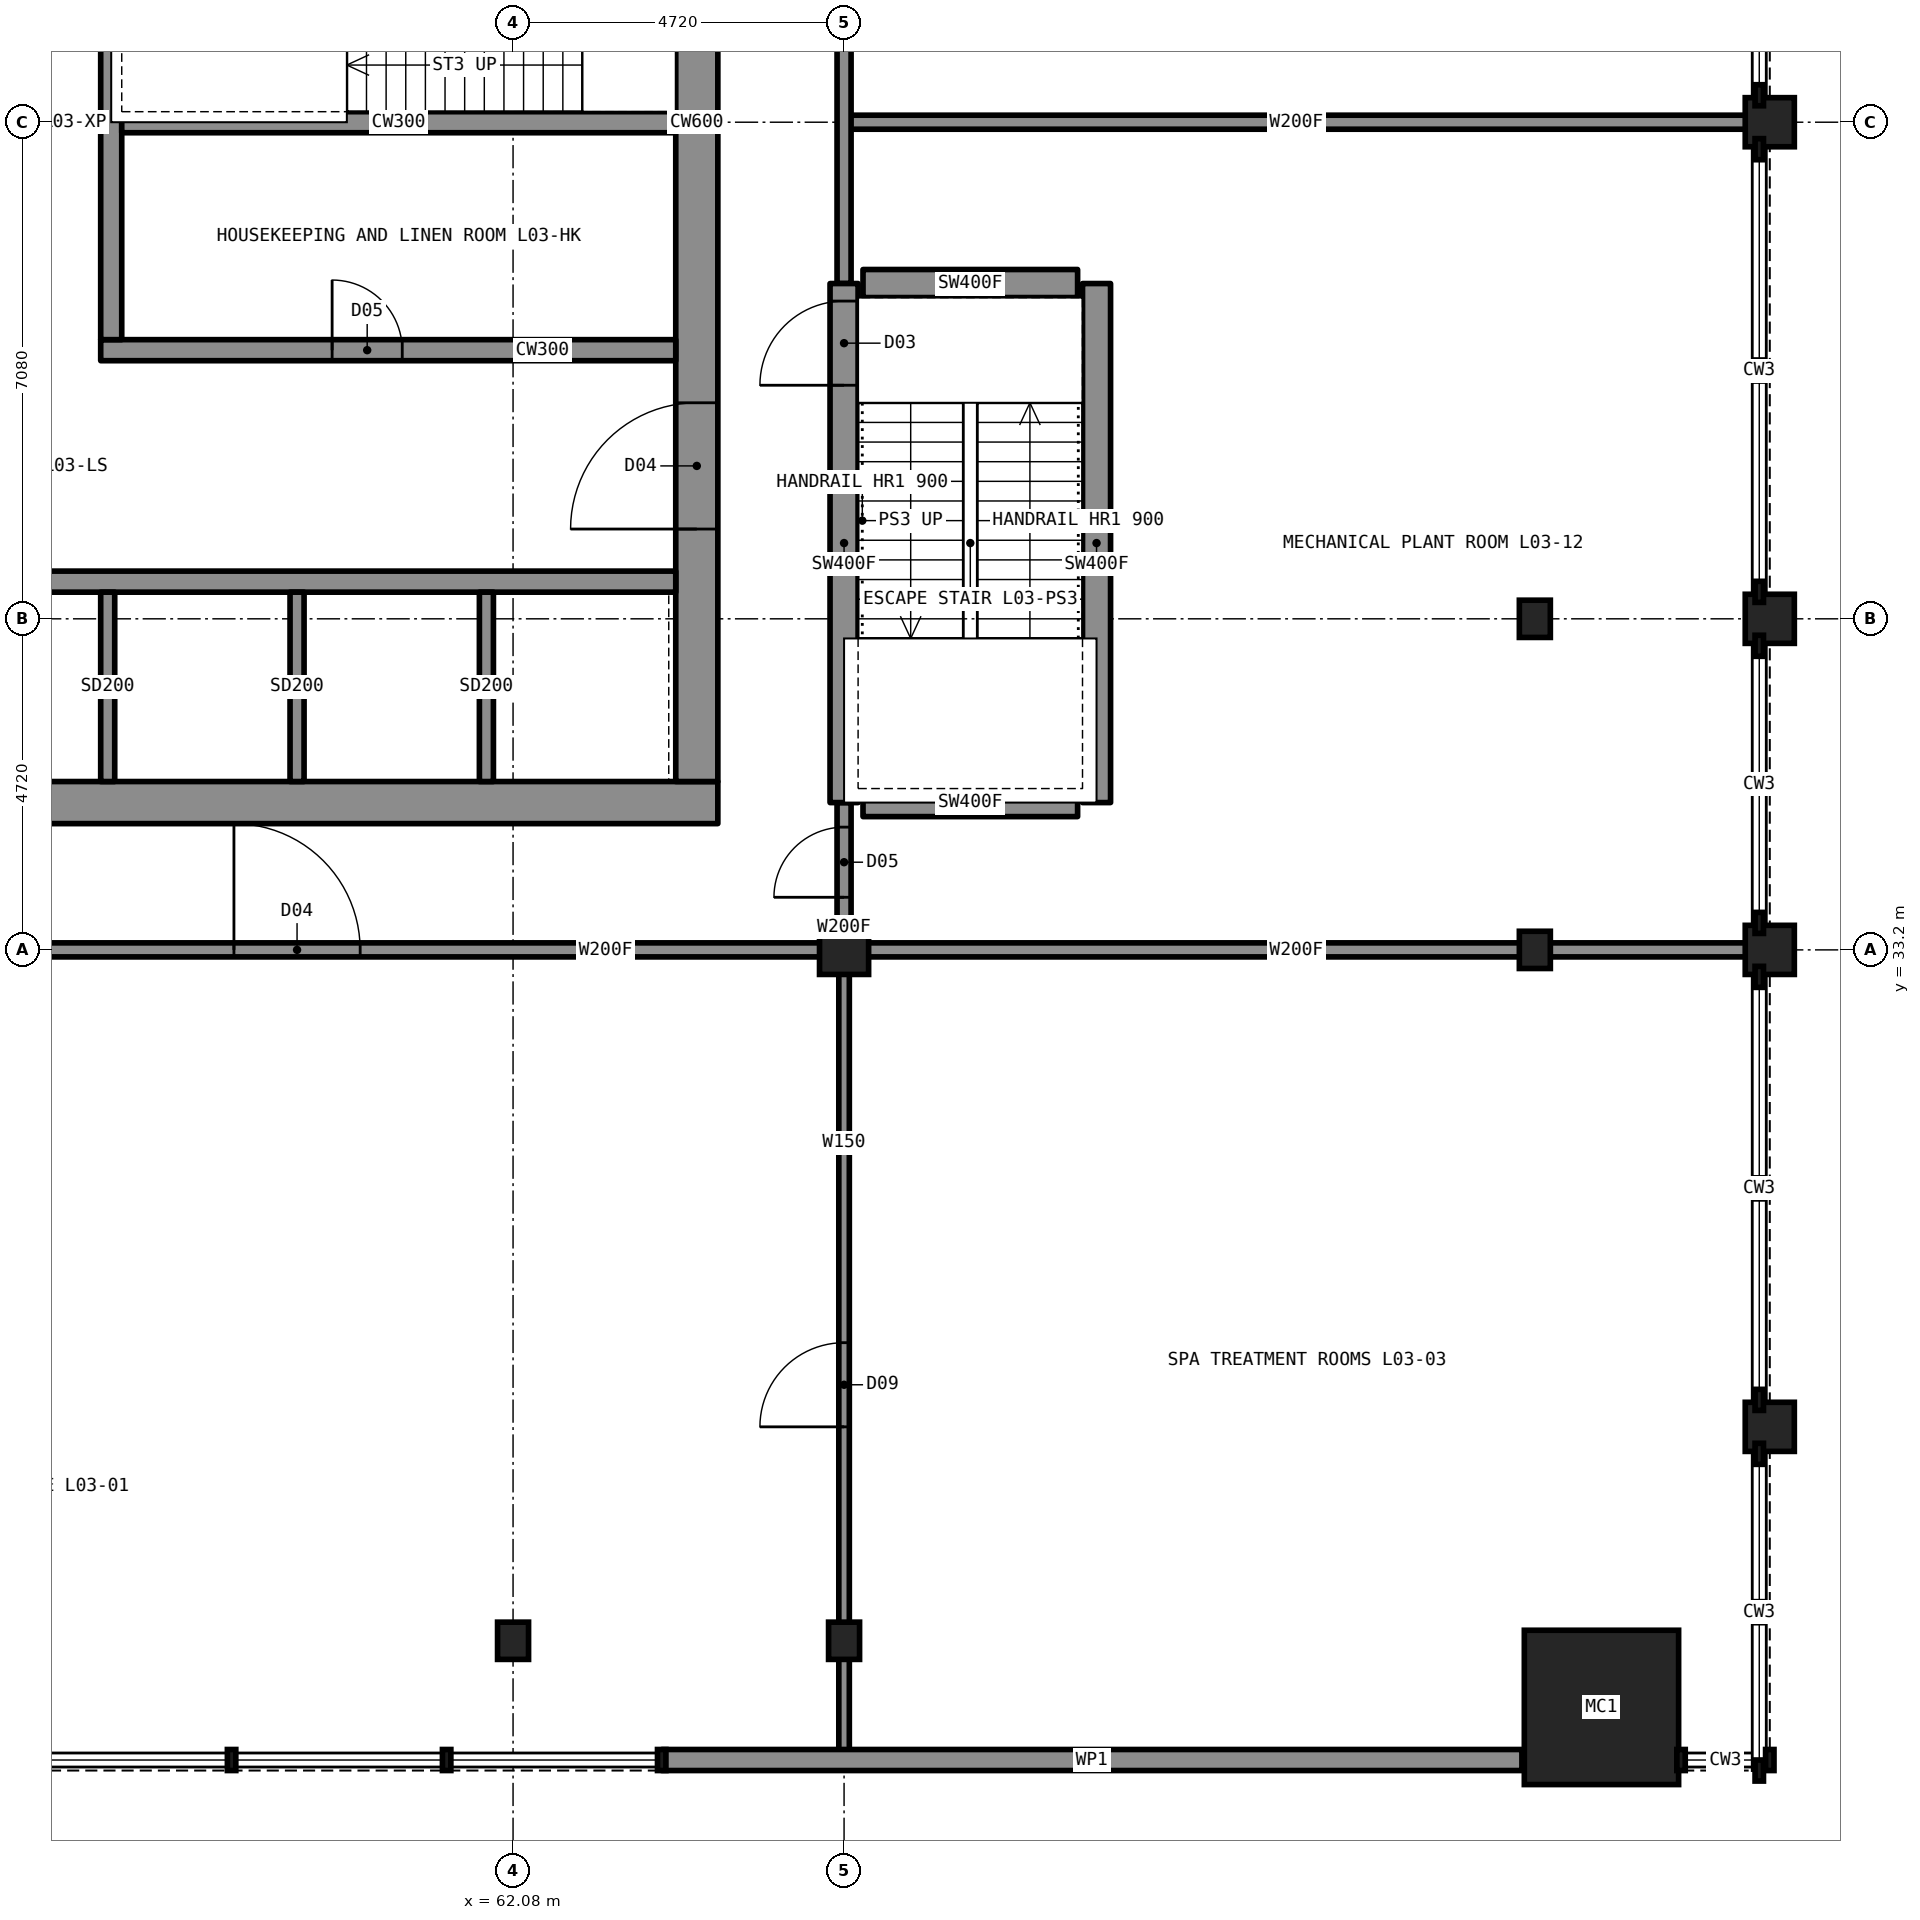
"""IFC4 building model, lengths in metres.
Left out: names, types, materials, properties, quantities, classifications, styles, units other than length and angle.
Written with IfcOpenShell. Run it as: python <this file> out.ifc"""

import sys

from ifc_helpers import new_model, si_unit, direction, frame, frame_2d, origin, origin_2d, place, context, subcontext, project, spatial, rectangle, hollow_rectangle, i_section, extrude, element, fill, save


model = new_model("IFC4")
c1 = context("Model", 3, precision=1e-05, world=origin(), true_north=direction((0.0, 1.0)))
c2 = subcontext(c1, "Body", "Model", "MODEL_VIEW")
j1 = project(units=[si_unit("LENGTHUNIT", "METRE"), si_unit("PLANEANGLEUNIT", "RADIAN")], contexts=[c1])
p1 = place(None, origin())
s1 = spatial("IfcSite", under=j1, at=p1, CompositionType="ELEMENT")
p2 = place(p1, origin())
s2 = spatial("IfcBuilding", under=s1, at=p2, CompositionType="ELEMENT")
p3 = place(p2, frame((0.0, 0.0, 16.0)))
s3 = spatial("IfcBuildingStorey", under=s2, at=p3, CompositionType="ELEMENT", Elevation=16.0)
for number, where, z_axis, x_axis in (
    (1, (62.08, 23.35, 0.0), (0.0, 0.0, 1.0), (1.0, 0.0, 0.0)),
    (2, (66.8, 23.35, 0.0), (0.0, 0.0, 1.0), (1.0, 0.0, 0.0)),
    (3, (76.65, 33.2, 0.0), (0.0, 0.0, 1.0), (1.0, 0.0, 0.0)),
    (4, (76.65, 37.92, 0.0), (0.0, 0.0, 1.0), (1.0, 0.0, 0.0)),
):
    element("IfcColumn", number, at=place(p3, frame(where, z_axis=z_axis, x_axis=x_axis)), inside=s3, PredefinedType="COLUMN", context=c2, shape_type="SweptSolid", body=[
        extrude(i_section(OverallWidth=0.442, OverallDepth=0.531, WebThickness=0.066, FlangeThickness=0.106, at=origin_2d()), origin(), (0.0, 0.0, 1.0), 4.5),
    ])
p4 = place(p3, frame((66.8, 33.2, 0.0), z_axis=(0.0, 0.0, 1.0), x_axis=(1.0, 0.0, 0.0)))
e5 = element("IfcColumn", 5, at=p4, inside=s3, PredefinedType="COLUMN", context=c2, shape_type="SweptSolid", body=[
    extrude(hollow_rectangle(XDim=0.7, YDim=0.7, WallThickness=0.06, at=origin_2d()), origin(), (0.0, 0.0, 1.0), 4.5),
])
p5 = place(p3, frame((77.6, 22.4, 0.0), z_axis=(0.0, 0.0, 1.0), x_axis=(1.0, 0.0, 0.0)))
e6 = element("IfcColumn", 6, at=p5, inside=s3, PredefinedType="COLUMN", context=c2, shape_type="SweptSolid", body=[
    extrude(hollow_rectangle(XDim=2.2, YDim=2.2, WallThickness=0.15, at=origin_2d()), origin(), (0.0, 0.0, 1.0), 4.5),
])
for number, where, z_axis, x_axis in (
    (7, (80.0, 26.4, 0.0), (0.0, 0.0, 1.0), (1.0, 0.0, 0.0)),
    (8, (80.0, 33.2, 0.0), (0.0, 0.0, 1.0), (1.0, 0.0, 0.0)),
    (9, (80.0, 37.92, 0.0), (0.0, 0.0, 1.0), (1.0, 0.0, 0.0)),
    (10, (80.0, 45.0, 0.0), (0.0, 0.0, 1.0), (1.0, 0.0, 0.0)),
):
    element("IfcColumn", number, at=place(p3, frame(where, z_axis=z_axis, x_axis=x_axis)), inside=s3, PredefinedType="COLUMN", context=c2, shape_type="SweptSolid", body=[
        extrude(rectangle(XDim=0.7, YDim=0.7, at=origin_2d()), origin(), (0.0, 0.0, 1.0), 4.5),
    ])
p6 = place(p3, frame((45.0, 35.3, 0.0), z_axis=(0.0, 0.0, 1.0), x_axis=(1.0, 0.0, 0.0)))
e11 = element("IfcWall", 11, at=p6, inside=s3, PredefinedType="SHEAR", context=c2, shape_type="SweptSolid", body=[
    extrude(rectangle(XDim=20.0, YDim=0.6, at=frame_2d((10.0, 0.0))), origin(), (0.0, 0.0, 1.0), 4.5),
])
p7 = place(p3, frame((64.7, 35.6, 0.0), z_axis=(0.0, 0.0, 1.0), x_axis=(0.0, 1.0, 0.0)))
e12 = element("IfcWall", 12, at=p7, inside=s3, PredefinedType="SHEAR", context=c2, shape_type="SweptSolid", body=[
    extrude(rectangle(XDim=18.8, YDim=0.6, at=frame_2d((9.4, 0.0))), origin(), (0.0, 0.0, 1.0), 4.5),
])
p8 = place(p7, frame((13.4, 0.0, 0.0)))
e13 = element("IfcOpeningElement", 13, at=p8, cuts=e12, PredefinedType="OPENING", context=c2, shape_type="SweptSolid", body=[
    extrude(rectangle(XDim=1.8, YDim=2.2, at=frame_2d((0.9, 1.1))), frame((0.0, 0.31, 0.0), z_axis=(0.0, -1.0, 0.0), x_axis=(1.0, 0.0, 0.0)), (0.0, 0.0, 1.0), 0.62),
])
p9 = place(p7, frame((3.6, 0.0, 0.0)))
e14 = element("IfcOpeningElement", 14, at=p9, cuts=e12, PredefinedType="OPENING", context=c2, shape_type="SweptSolid", body=[
    extrude(rectangle(XDim=1.8, YDim=2.2, at=frame_2d((0.9, 1.1))), frame((0.0, 0.31, 0.0), z_axis=(0.0, -1.0, 0.0), x_axis=(1.0, 0.0, 0.0)), (0.0, 0.0, 1.0), 0.62),
])
p10 = place(p3, frame((45.6, 38.45, 0.0), z_axis=(0.0, 0.0, 1.0), x_axis=(1.0, 0.0, 0.0)))
e15 = element("IfcWall", 15, at=p10, inside=s3, PredefinedType="SHEAR", context=c2, shape_type="SweptSolid", body=[
    extrude(rectangle(XDim=18.8, YDim=0.3, at=frame_2d((9.4, 0.0))), origin(), (0.0, 0.0, 1.0), 4.5),
])
p11 = place(p3, frame((56.2, 41.75, 0.0), z_axis=(0.0, 0.0, 1.0), x_axis=(1.0, 0.0, 0.0)))
e16 = element("IfcWall", 16, at=p11, inside=s3, PredefinedType="SHEAR", context=c2, shape_type="SweptSolid", body=[
    extrude(rectangle(XDim=8.2, YDim=0.3, at=frame_2d((4.1, 0.0))), origin(), (0.0, 0.0, 1.0), 4.5),
])
p12 = place(p11, frame((3.3, 0.0, 0.0)))
e17 = element("IfcOpeningElement", 17, at=p12, cuts=e16, PredefinedType="OPENING", context=c2, shape_type="SweptSolid", body=[
    extrude(rectangle(XDim=1.0, YDim=2.1, at=frame_2d((0.5, 1.05))), frame((0.0, 0.16, 0.0), z_axis=(0.0, -1.0, 0.0), x_axis=(1.0, 0.0, 0.0)), (0.0, 0.0, 1.0), 0.32),
])
p13 = place(p3, frame((56.35, 41.9, 0.0), z_axis=(0.0, 0.0, 1.0), x_axis=(0.0, 1.0, 0.0)))
e18 = element("IfcWall", 18, at=p13, inside=s3, PredefinedType="SHEAR", context=c2, shape_type="SweptSolid", body=[
    extrude(rectangle(XDim=9.5, YDim=0.3, at=frame_2d((4.75, 0.0))), origin(), (0.0, 0.0, 1.0), 4.5),
])
p14 = place(p13, frame((7.1, 0.0, 0.0)))
e19 = element("IfcOpeningElement", 19, at=p14, cuts=e18, PredefinedType="OPENING", context=c2, shape_type="SweptSolid", body=[
    extrude(rectangle(XDim=1.8, YDim=2.2, at=frame_2d((0.9, 1.1))), frame((0.0, 0.16, 0.0), z_axis=(0.0, -1.0, 0.0), x_axis=(1.0, 0.0, 0.0)), (0.0, 0.0, 1.0), 0.32),
])
p15 = place(p3, frame((56.5, 45.0, 0.0), z_axis=(0.0, 0.0, 1.0), x_axis=(1.0, 0.0, 0.0)))
e20 = element("IfcWall", 20, at=p15, inside=s3, PredefinedType="SHEAR", context=c2, shape_type="SweptSolid", body=[
    extrude(rectangle(XDim=7.9, YDim=0.3, at=frame_2d((3.95, 0.0))), origin(), (0.0, 0.0, 1.0), 4.5),
])
p16 = place(p3, frame((52.7, 33.2, 0.0), z_axis=(0.0, 0.0, 1.0), x_axis=(1.0, 0.0, 0.0)))
e21 = element("IfcWall", 21, at=p16, inside=s3, PredefinedType="PARTITIONING", context=c2, shape_type="SweptSolid", body=[
    extrude(rectangle(XDim=14.1, YDim=0.2, at=frame_2d((7.05, 0.0))), origin(), (0.0, 0.0, 1.0), 4.15),
])
p17 = place(p16, frame((5.4, 0.0, 0.0)))
e22 = element("IfcOpeningElement", 22, at=p17, cuts=e21, PredefinedType="OPENING", context=c2, shape_type="SweptSolid", body=[
    extrude(rectangle(XDim=1.8, YDim=2.2, at=frame_2d((0.9, 1.1))), frame((0.0, 0.11, 0.0), z_axis=(0.0, -1.0, 0.0), x_axis=(1.0, 0.0, 0.0)), (0.0, 0.0, 1.0), 0.22),
])
p18 = place(p3, frame((66.8, 33.2, 0.0), z_axis=(0.0, 0.0, 1.0), x_axis=(1.0, 0.0, 0.0)))
e23 = element("IfcWall", 23, at=p18, inside=s3, PredefinedType="PARTITIONING", context=c2, shape_type="SweptSolid", body=[
    extrude(rectangle(XDim=12.9, YDim=0.2, at=frame_2d((6.45, 0.0))), origin(), (0.0, 0.0, 1.0), 4.15),
])
for number, where, z_axis, x_axis in (
    (24, (67.07, 42.7, 0.0), (0.0, 0.0, 1.0), (1.0, 0.0, 0.0)),
    (25, (67.07, 35.3, 0.0), (0.0, 0.0, 1.0), (1.0, 0.0, 0.0)),
):
    element("IfcWall", number, at=place(p3, frame(where, z_axis=z_axis, x_axis=x_axis)), inside=s3, PredefinedType="SHEAR", context=c2, shape_type="SweptSolid", body=[
        extrude(rectangle(XDim=3.06, YDim=0.4, at=frame_2d((1.53, 0.0))), origin(), (0.0, 0.0, 1.0), 4.5),
    ])
p19 = place(p3, frame((66.8, 45.0, 0.0), z_axis=(0.0, 0.0, 1.0), x_axis=(1.0, 0.0, 0.0)))
e26 = element("IfcWall", 26, at=p19, inside=s3, PredefinedType="PARTITIONING", context=c2, shape_type="SweptSolid", body=[
    extrude(rectangle(XDim=12.9, YDim=0.2, at=frame_2d((6.45, 0.0))), origin(), (0.0, 0.0, 1.0), 4.15),
])
p20 = place(p3, frame((66.8, 33.2, 0.0), z_axis=(0.0, 0.0, 1.0), x_axis=(0.0, 1.0, 0.0)))
e27 = element("IfcWall", 27, at=p20, inside=s3, PredefinedType="PARTITIONING", context=c2, shape_type="SweptSolid", body=[
    extrude(rectangle(XDim=2.1, YDim=0.2, at=frame_2d((1.05, 0.0))), origin(), (0.0, 0.0, 1.0), 4.15),
])
p21 = place(p20, frame((0.75, 0.0, 0.0)))
e28 = element("IfcOpeningElement", 28, at=p21, cuts=e27, PredefinedType="OPENING", context=c2, shape_type="SweptSolid", body=[
    extrude(rectangle(XDim=1.0, YDim=2.1, at=frame_2d((0.5, 1.05))), frame((0.0, 0.11, 0.0), z_axis=(0.0, -1.0, 0.0), x_axis=(1.0, 0.0, 0.0)), (0.0, 0.0, 1.0), 0.22),
])
p22 = place(p3, frame((66.8, 42.7, 0.0), z_axis=(0.0, 0.0, 1.0), x_axis=(0.0, 1.0, 0.0)))
e29 = element("IfcWall", 29, at=p22, inside=s3, PredefinedType="PARTITIONING", context=c2, shape_type="SweptSolid", body=[
    extrude(rectangle(XDim=14.1, YDim=0.2, at=frame_2d((7.05, 0.0))), origin(), (0.0, 0.0, 1.0), 4.15),
])
p23 = place(p22, frame((8.8, 0.0, 0.0)))
e30 = element("IfcOpeningElement", 30, at=p23, cuts=e29, PredefinedType="OPENING", context=c2, shape_type="SweptSolid", body=[
    extrude(rectangle(XDim=1.0, YDim=2.1, at=frame_2d((0.5, 1.05))), frame((0.0, 0.11, 0.0), z_axis=(0.0, -1.0, 0.0), x_axis=(1.0, 0.0, 0.0)), (0.0, 0.0, 1.0), 0.22),
])
p24 = place(p3, frame((66.8, 21.755, 0.0), z_axis=(0.0, 0.0, 1.0), x_axis=(0.0, 1.0, 0.0)))
e31 = element("IfcWall", 31, at=p24, inside=s3, PredefinedType="PARTITIONING", context=c2, shape_type="SweptSolid", body=[
    extrude(rectangle(XDim=11.445, YDim=0.15, at=frame_2d((5.723, 0.0))), origin(), (0.0, 0.0, 1.0), 4.15),
])
p25 = place(p24, frame((4.645, 0.0, 0.0)))
e32 = element("IfcOpeningElement", 32, at=p25, cuts=e31, PredefinedType="OPENING", context=c2, shape_type="SweptSolid", body=[
    extrude(rectangle(XDim=1.2, YDim=2.2, at=frame_2d((0.6, 1.1))), frame((0.0, 0.085, 0.0), z_axis=(0.0, -1.0, 0.0), x_axis=(1.0, 0.0, 0.0)), (0.0, 0.0, 1.0), 0.17),
])
p26 = place(p3, frame((66.8, 35.3, 0.0), z_axis=(0.0, 0.0, 1.0), x_axis=(0.0, 1.0, 0.0)))
e33 = element("IfcWall", 33, at=p26, inside=s3, PredefinedType="SHEAR", context=c2, shape_type="SweptSolid", body=[
    extrude(rectangle(XDim=7.4, YDim=0.4, at=frame_2d((3.7, 0.0))), origin(), (0.0, 0.0, 1.0), 4.5),
])
p27 = place(p26, frame((5.95, 0.0, 0.0)))
e34 = element("IfcOpeningElement", 34, at=p27, cuts=e33, PredefinedType="OPENING", context=c2, shape_type="SweptSolid", body=[
    extrude(rectangle(XDim=1.2, YDim=2.2, at=frame_2d((0.6, 1.1))), frame((0.0, 0.21, 0.0), z_axis=(0.0, -1.0, 0.0), x_axis=(1.0, 0.0, 0.0)), (0.0, 0.0, 1.0), 0.42),
])
p28 = place(p3, frame((70.4, 35.3, 0.0), z_axis=(0.0, 0.0, 1.0), x_axis=(0.0, 1.0, 0.0)))
e35 = element("IfcWall", 35, at=p28, inside=s3, PredefinedType="SHEAR", context=c2, shape_type="SweptSolid", body=[
    extrude(rectangle(XDim=7.4, YDim=0.4, at=frame_2d((3.7, 0.0))), origin(), (0.0, 0.0, 1.0), 4.5),
])
for number, where, z_axis, x_axis in (
    (36, (56.3, 35.6, 0.0), (0.0, 0.0, 1.0), (0.0, 1.0, 0.0)),
    (37, (59.0, 35.6, 0.0), (0.0, 0.0, 1.0), (0.0, 1.0, 0.0)),
    (38, (61.7, 35.6, 0.0), (0.0, 0.0, 1.0), (0.0, 1.0, 0.0)),
):
    element("IfcWall", number, at=place(p3, frame(where, z_axis=z_axis, x_axis=x_axis)), inside=s3, PredefinedType="PARTITIONING", context=c2, shape_type="SweptSolid", body=[
        extrude(rectangle(XDim=2.7, YDim=0.2, at=frame_2d((1.35, 0.0))), origin(), (0.0, 0.0, 1.0), 4.15),
    ])
p29 = place(p3, frame((64.199, 21.65, 0.0), z_axis=(0.0, 0.0, 1.0), x_axis=(1.0, 0.0, 0.0)))
e39 = element("IfcWall", 39, at=p29, inside=s3, PredefinedType="SOLIDWALL", context=c2, shape_type="SweptSolid", body=[
    extrude(rectangle(XDim=12.266, YDim=0.3, at=frame_2d((6.133, 0.0))), origin(), (0.0, 0.0, 1.0), 4.15),
])
p30 = place(p27, origin())
e40 = element("IfcDoor", 40, at=p30, inside=s3, OperationType="SINGLE_SWING_LEFT", PredefinedType="DOOR", context=c2, shape_type="SweptSolid", body=[
    extrude(rectangle(XDim=1.2, YDim=2.2, at=frame_2d((0.6, 1.1))), frame((0.0, 0.025, 0.0), z_axis=(0.0, -1.0, 0.0), x_axis=(1.0, 0.0, 0.0)), (0.0, 0.0, 1.0), 0.05),
])
fill(e34, e40)
p31 = place(p17, origin())
e41 = element("IfcDoor", 41, at=p31, inside=s3, OperationType="DOUBLE_DOOR_SINGLE_SWING", PredefinedType="DOOR", context=c2, shape_type="SweptSolid", body=[
    extrude(rectangle(XDim=1.8, YDim=2.2, at=frame_2d((0.9, 1.1))), frame((0.0, 0.025, 0.0), z_axis=(0.0, -1.0, 0.0), x_axis=(1.0, 0.0, 0.0)), (0.0, 0.0, 1.0), 0.05),
])
fill(e22, e41)
p32 = place(p25, origin())
e42 = element("IfcDoor", 42, at=p32, inside=s3, OperationType="SINGLE_SWING_LEFT", PredefinedType="DOOR", context=c2, shape_type="SweptSolid", body=[
    extrude(rectangle(XDim=1.2, YDim=2.2, at=frame_2d((0.6, 1.1))), frame((0.0, 0.025, 0.0), z_axis=(0.0, -1.0, 0.0), x_axis=(1.0, 0.0, 0.0)), (0.0, 0.0, 1.0), 0.05),
])
fill(e32, e42)
p33 = place(p21, origin())
e43 = element("IfcDoor", 43, at=p33, inside=s3, OperationType="SINGLE_SWING_LEFT", PredefinedType="DOOR", context=c2, shape_type="SweptSolid", body=[
    extrude(rectangle(XDim=1.0, YDim=2.1, at=frame_2d((0.5, 1.05))), frame((0.0, 0.025, 0.0), z_axis=(0.0, -1.0, 0.0), x_axis=(1.0, 0.0, 0.0)), (0.0, 0.0, 1.0), 0.05),
])
fill(e28, e43)
p34 = place(p9, origin())
e44 = element("IfcDoor", 44, at=p34, inside=s3, OperationType="DOUBLE_DOOR_SINGLE_SWING", PredefinedType="DOOR", context=c2, shape_type="SweptSolid", body=[
    extrude(rectangle(XDim=1.8, YDim=2.2, at=frame_2d((0.9, 1.1))), frame((0.0, 0.025, 0.0), z_axis=(0.0, -1.0, 0.0), x_axis=(1.0, 0.0, 0.0)), (0.0, 0.0, 1.0), 0.05),
])
fill(e14, e44)
p35 = place(p12, origin())
e45 = element("IfcDoor", 45, at=p35, inside=s3, OperationType="SINGLE_SWING_LEFT", PredefinedType="DOOR", context=c2, shape_type="SweptSolid", body=[
    extrude(rectangle(XDim=1.0, YDim=2.1, at=frame_2d((0.5, 1.05))), frame((0.0, 0.025, 0.0), z_axis=(0.0, -1.0, 0.0), x_axis=(1.0, 0.0, 0.0)), (0.0, 0.0, 1.0), 0.05),
])
fill(e17, e45)
save(model, sys.argv[1])
